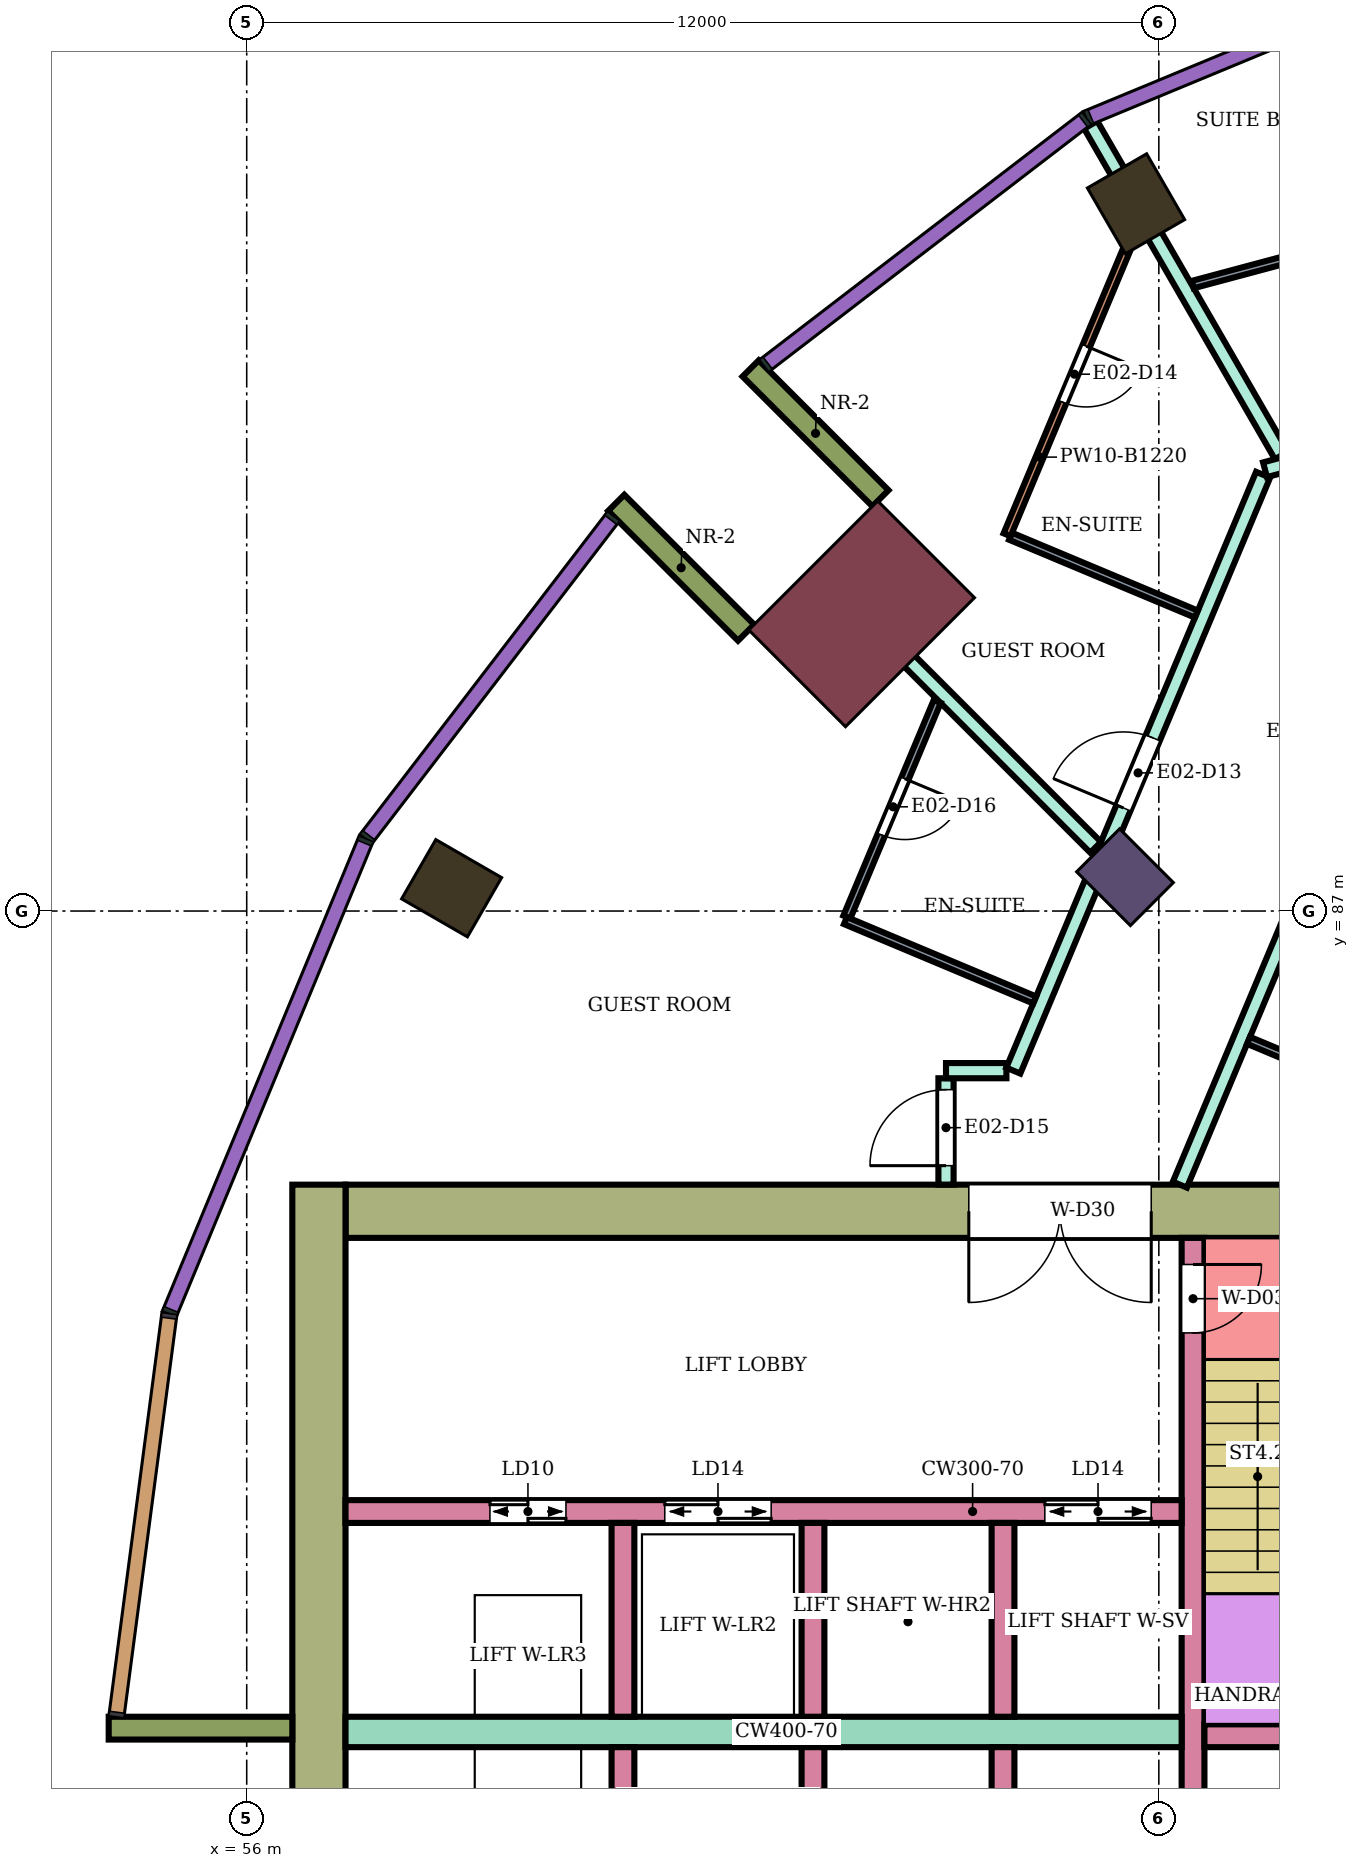
"""IFC4 building model, lengths in metres.
Left out: names, types, materials, properties, quantities, classifications, styles, units other than length and angle.
Written with IfcOpenShell. Run it as: python <this file> out.ifc"""

import sys

from ifc_helpers import new_model, si_unit, direction, frame, frame_2d, origin, origin_2d, place, context, subcontext, project, spatial, rectangle, extrude, element, fill, save


model = new_model("IFC4")
c1 = context("Model", 3, precision=1e-05, world=origin(), true_north=direction((0.0, 1.0)))
c2 = subcontext(c1, "Body", "Model", "MODEL_VIEW")
j1 = project(units=[si_unit("LENGTHUNIT", "METRE"), si_unit("PLANEANGLEUNIT", "RADIAN")], contexts=[c1])
p1 = place(None, origin())
s1 = spatial("IfcSite", under=j1, at=p1, CompositionType="ELEMENT")
p2 = place(p1, origin())
s2 = spatial("IfcBuilding", under=s1, at=p2, CompositionType="ELEMENT")
p3 = place(p2, frame((0.0, 0.0, 130.2)))
s3 = spatial("IfcBuildingStorey", under=s2, at=p3, CompositionType="ELEMENT", Elevation=130.2)
for number, where, z_axis, x_axis in (
    (1, (67.7, 96.304, 0.0), (0.0, 0.0, 1.0), (-0.5, 0.866, 0.0)),
    (2, (58.696, 87.3, 0.0), (0.0, 0.0, 1.0), (-0.866, 0.5, 0.0)),
):
    element("IfcColumn", number, at=place(p3, frame(where, z_axis=z_axis, x_axis=x_axis)), inside=s3, PredefinedType="COLUMN", context=c2, shape_type="SweptSolid", body=[
        extrude(rectangle(XDim=1.0, YDim=0.9, at=origin_2d()), origin(), (0.0, 0.0, 1.0), 3.9),
    ])
p4 = place(p3, frame((67.555, 87.445, 0.0), z_axis=(0.0, 0.0, 1.0), x_axis=(-0.707106781187, 0.707106781187, 0.0)))
e3 = element("IfcColumn", 3, at=p4, inside=s3, PredefinedType="COLUMN", context=c2, shape_type="SweptSolid", body=[
    extrude(rectangle(XDim=1.0, YDim=0.8, at=origin_2d()), origin(), (0.0, 0.0, 1.0), 3.9),
])
p5 = place(p3, frame((64.09, 90.91, 0.0), z_axis=(0.0, 0.0, 1.0), x_axis=(-0.707106781187, 0.707106781187, 0.0)))
e4 = element("IfcColumn", 4, at=p5, inside=s3, PredefinedType="COLUMN", context=c2, shape_type="SweptSolid", body=[
    extrude(rectangle(XDim=1.8, YDim=2.4, at=origin_2d()), origin(), (0.0, 0.0, 1.0), 3.9),
])
p6 = place(p3, frame((72.1, 83.05, 0.0), z_axis=(0.0, 0.0, 1.0), x_axis=(-1.0, 0.0, 0.0)))
e5 = element("IfcWall", 5, at=p6, inside=s3, PredefinedType="SHEAR", context=c2, shape_type="SweptSolid", body=[
    extrude(rectangle(XDim=14.8, YDim=0.7, at=frame_2d((7.4, 0.0))), origin(), (0.0, 0.0, 1.0), 3.58),
])
p7 = place(p6, frame((4.2, 0.0, 0.0)))
e6 = element("IfcOpeningElement", 6, at=p7, cuts=e5, PredefinedType="OPENING", context=c2, shape_type="SweptSolid", body=[
    extrude(rectangle(XDim=2.4, YDim=2.4, at=frame_2d((1.2, 1.2))), frame((0.0, 0.36, 0.0), z_axis=(0.0, -1.0, 0.0), x_axis=(1.0, 0.0, 0.0)), (0.0, 0.0, 1.0), 0.72),
])
p8 = place(p3, frame((56.95, 83.4, 0.0), z_axis=(0.0, 0.0, 1.0), x_axis=(0.0, -1.0, 0.0)))
e7 = element("IfcWall", 7, at=p8, inside=s3, PredefinedType="SHEAR", context=c2, shape_type="SweptSolid", body=[
    extrude(rectangle(XDim=16.8, YDim=0.7, at=frame_2d((8.4, 0.0))), origin(), (0.0, 0.0, 1.0), 3.58),
])
p9 = place(p3, frame((68.45, 82.7, 0.0), z_axis=(0.0, 0.0, 1.0), x_axis=(0.0, -1.0, 0.0)))
e8 = element("IfcWall", 8, at=p9, inside=s3, PredefinedType="SHEAR", context=c2, shape_type="SweptSolid", body=[
    extrude(rectangle(XDim=7.7, YDim=0.3, at=frame_2d((3.85, 0.0))), origin(), (0.0, 0.0, 1.0), 3.58),
])
p10 = place(p9, frame((0.35, 0.0, 0.0)))
e9 = element("IfcOpeningElement", 9, at=p10, cuts=e8, PredefinedType="OPENING", context=c2, shape_type="SweptSolid", body=[
    extrude(rectangle(XDim=0.9, YDim=2.1, at=frame_2d((0.45, 1.05))), frame((0.0, 0.16, 0.0), z_axis=(0.0, -1.0, 0.0), x_axis=(1.0, 0.0, 0.0)), (0.0, 0.0, 1.0), 0.32),
])
p11 = place(p3, frame((71.65, 76.15, 0.0), z_axis=(0.0, 0.0, 1.0), x_axis=(-1.0, 0.0, 0.0)))
e10 = element("IfcWall", 10, at=p11, inside=s3, PredefinedType="SHEAR", context=c2, shape_type="SweptSolid", body=[
    extrude(rectangle(XDim=3.05, YDim=0.3, at=frame_2d((1.525, 0.0))), origin(), (0.0, 0.0, 1.0), 3.58),
])
p12 = place(p3, frame((68.3, 76.2, 0.0), z_axis=(0.0, 0.0, 1.0), x_axis=(-1.0, 0.0, 0.0)))
e11 = element("IfcWall", 11, at=p12, inside=s3, PredefinedType="SHEAR", context=c2, shape_type="SweptSolid", body=[
    extrude(rectangle(XDim=11.0, YDim=0.4, at=frame_2d((5.5, 0.0))), origin(), (0.0, 0.0, 1.0), 3.58),
])
p13 = place(p3, frame((68.3, 79.1, 0.0), z_axis=(0.0, 0.0, 1.0), x_axis=(-1.0, 0.0, 0.0)))
e12 = element("IfcWall", 12, at=p13, inside=s3, PredefinedType="SHEAR", context=c2, shape_type="SweptSolid", body=[
    extrude(rectangle(XDim=11.0, YDim=0.3, at=frame_2d((5.5, 0.0))), origin(), (0.0, 0.0, 1.0), 3.58),
])
p14 = place(p13, frame((0.4, 0.0, 0.0)))
e13 = element("IfcOpeningElement", 13, at=p14, cuts=e12, PredefinedType="OPENING", context=c2, shape_type="SweptSolid", body=[
    extrude(rectangle(XDim=1.4, YDim=2.1, at=frame_2d((0.7, 1.05))), frame((0.0, 0.16, 0.0), z_axis=(0.0, -1.0, 0.0), x_axis=(1.0, 0.0, 0.0)), (0.0, 0.0, 1.0), 0.32),
])
p15 = place(p13, frame((5.4, 0.0, 0.0)))
e14 = element("IfcOpeningElement", 14, at=p15, cuts=e12, PredefinedType="OPENING", context=c2, shape_type="SweptSolid", body=[
    extrude(rectangle(XDim=1.4, YDim=2.1, at=frame_2d((0.7, 1.05))), frame((0.0, 0.16, 0.0), z_axis=(0.0, -1.0, 0.0), x_axis=(1.0, 0.0, 0.0)), (0.0, 0.0, 1.0), 0.32),
])
p16 = place(p13, frame((8.1, 0.0, 0.0)))
e15 = element("IfcOpeningElement", 15, at=p16, cuts=e12, PredefinedType="OPENING", context=c2, shape_type="SweptSolid", body=[
    extrude(rectangle(XDim=1.0, YDim=2.1, at=frame_2d((0.5, 1.05))), frame((0.0, 0.16, 0.0), z_axis=(0.0, -1.0, 0.0), x_axis=(1.0, 0.0, 0.0)), (0.0, 0.0, 1.0), 0.32),
])
for number, where, z_axis, x_axis in (
    (16, (65.95, 76.0, 0.0), (0.0, 0.0, 1.0), (0.0, -1.0, 0.0)),
    (17, (63.45, 76.0, 0.0), (0.0, 0.0, 1.0), (0.0, -1.0, 0.0)),
    (18, (60.95, 76.0, 0.0), (0.0, 0.0, 1.0), (0.0, -1.0, 0.0)),
    (19, (65.95, 78.95, 0.0), (0.0, 0.0, 1.0), (0.0, -1.0, 0.0)),
    (20, (63.45, 78.95, 0.0), (0.0, 0.0, 1.0), (0.0, -1.0, 0.0)),
    (21, (60.95, 78.95, 0.0), (0.0, 0.0, 1.0), (0.0, -1.0, 0.0)),
):
    element("IfcWall", number, at=place(p3, frame(where, z_axis=z_axis, x_axis=x_axis)), inside=s3, PredefinedType="SHEAR", context=c2, shape_type="SweptSolid", body=[
        extrude(rectangle(XDim=2.55, YDim=0.3, at=frame_2d((1.275, 0.0))), origin(), (0.0, 0.0, 1.0), 3.58),
    ])
for number, where, z_axis, x_axis in (
    (22, (64.338, 92.43, 0.0), (0.0, 0.0, 1.0), (-0.707, 0.707, 0.0)),
    (23, (62.57, 90.662, 0.0), (0.0, 0.0, 1.0), (-0.707, 0.707, 0.0)),
    (24, (56.6, 76.25, 0.0), (0.0, 0.0, 1.0), (-1.0, 0.0, 0.0)),
):
    element("IfcWall", number, at=place(p3, frame(where, z_axis=z_axis, x_axis=x_axis)), inside=s3, PredefinedType="NOTDEFINED", context=c2, shape_type="SweptSolid", body=[
        extrude(rectangle(XDim=2.416, YDim=0.3, at=frame_2d((1.208, 0.0))), origin(), (0.0, 0.0, 1.0), 3.9),
    ])
p17 = place(p3, frame((63.6, 91.409, 0.0), z_axis=(0.0, 0.0, 1.0), x_axis=(0.706937509868, -0.707276011993, 0.0)))
e25 = element("IfcWall", 25, at=p17, inside=s3, PredefinedType="PARTITIONING", context=c2, shape_type="SweptSolid", body=[
    extrude(rectangle(XDim=5.049, YDim=0.2, at=frame_2d((2.524, 0.0))), origin(), (0.0, 0.0, 1.0), 3.45),
])
p18 = place(p3, frame((65.2, 83.401, 0.0), z_axis=(0.0, 0.0, 1.0), x_axis=(0.0, 1.0, 0.0)))
e26 = element("IfcWall", 26, at=p18, inside=s3, PredefinedType="PARTITIONING", context=c2, shape_type="SweptSolid", body=[
    extrude(rectangle(XDim=1.399, YDim=0.2, at=frame_2d((0.7, 0.0))), origin(), (0.0, 0.0, 1.0), 3.45),
])
p19 = place(p18, frame((0.249, 0.0, 0.0)))
e27 = element("IfcOpeningElement", 27, at=p19, cuts=e26, PredefinedType="OPENING", context=c2, shape_type="SweptSolid", body=[
    extrude(rectangle(XDim=1.0, YDim=2.1, at=frame_2d((0.5, 1.05))), frame((0.0, 0.11, 0.0), z_axis=(0.0, -1.0, 0.0), x_axis=(1.0, 0.0, 0.0)), (0.0, 0.0, 1.0), 0.22),
])
p20 = place(p3, frame((65.2, 84.9, 0.0), z_axis=(0.0, 0.0, 1.0), x_axis=(1.0, 0.0, 0.0)))
e28 = element("IfcWall", 28, at=p20, inside=s3, PredefinedType="PARTITIONING", context=c2, shape_type="SweptSolid", body=[
    extrude(rectangle(XDim=0.795, YDim=0.2, at=frame_2d((0.397, 0.0))), origin(), (0.0, 0.0, 1.0), 3.45),
])
p21 = place(p3, frame((66.085, 84.9, 0.0), z_axis=(0.0, 0.0, 1.0), x_axis=(0.386617151403, 0.922240303956, 0.0)))
e29 = element("IfcWall", 29, at=p21, inside=s3, PredefinedType="PARTITIONING", context=c2, shape_type="SweptSolid", body=[
    extrude(rectangle(XDim=8.5, YDim=0.2, at=frame_2d((4.25, 0.0))), origin(), (0.0, 0.0, 1.0), 3.45),
])
p22 = place(p21, frame((3.748, 0.0, 0.0)))
e30 = element("IfcOpeningElement", 30, at=p22, cuts=e29, PredefinedType="OPENING", context=c2, shape_type="SweptSolid", body=[
    extrude(rectangle(XDim=1.0, YDim=2.1, at=frame_2d((0.5, 1.05))), frame((0.0, 0.11, 0.0), z_axis=(0.0, -1.0, 0.0), x_axis=(1.0, 0.0, 0.0)), (0.0, 0.0, 1.0), 0.22),
])
p23 = place(p3, frame((67.104, 97.343, 0.0), z_axis=(0.0, 0.0, 1.0), x_axis=(0.499893606134, -0.866086821598, 0.0)))
e31 = element("IfcWall", 31, at=p23, inside=s3, PredefinedType="PARTITIONING", context=c2, shape_type="SweptSolid", body=[
    extrude(rectangle(XDim=5.021, YDim=0.2, at=frame_2d((2.511, 0.0))), origin(), (0.0, 0.0, 1.0), 3.45),
])
p24 = place(p3, frame((68.277, 83.4, 0.0), z_axis=(0.0, 0.0, 1.0), x_axis=(0.386454861164, 0.922308321703, 0.0)))
e32 = element("IfcWall", 32, at=p24, inside=s3, PredefinedType="PARTITIONING", context=c2, shape_type="SweptSolid", body=[
    extrude(rectangle(XDim=7.762, YDim=0.2, at=frame_2d((3.881, 0.0))), origin(), (0.0, 0.0, 1.0), 3.45),
])
p25 = place(p24, frame((5.351, 0.0, 0.0)))
e33 = element("IfcOpeningElement", 33, at=p25, cuts=e32, PredefinedType="OPENING", context=c2, shape_type="SweptSolid", body=[
    extrude(rectangle(XDim=1.0, YDim=2.1, at=frame_2d((0.5, 1.05))), frame((0.0, 0.11, 0.0), z_axis=(0.0, -1.0, 0.0), x_axis=(1.0, 0.0, 0.0)), (0.0, 0.0, 1.0), 0.22),
])
p26 = place(p3, frame((69.397, 92.805, 0.0), z_axis=(0.0, 0.0, 1.0), x_axis=(0.965971666602, 0.258647906087, 0.0)))
e34 = element("IfcWall", 34, at=p26, inside=s3, PredefinedType="PARTITIONING", context=c2, shape_type="SweptSolid", body=[
    extrude(rectangle(XDim=10.887, YDim=0.2, at=frame_2d((5.443, 0.0))), origin(), (0.0, 0.0, 1.0), 3.45),
])
p27 = place(p26, frame((6.163, 0.0, 0.0)))
e35 = element("IfcOpeningElement", 35, at=p27, cuts=e34, PredefinedType="OPENING", context=c2, shape_type="SweptSolid", body=[
    extrude(rectangle(XDim=1.0, YDim=2.1, at=frame_2d((0.5, 1.05))), frame((0.0, 0.11, 0.0), z_axis=(0.0, -1.0, 0.0), x_axis=(1.0, 0.0, 0.0)), (0.0, 0.0, 1.0), 0.22),
])
p28 = place(p26, frame((2.461, 0.0, 0.0)))
e36 = element("IfcOpeningElement", 36, at=p28, cuts=e34, PredefinedType="OPENING", context=c2, shape_type="SweptSolid", body=[
    extrude(rectangle(XDim=1.0, YDim=2.1, at=frame_2d((0.5, 1.05))), frame((0.0, 0.11, 0.0), z_axis=(0.0, -1.0, 0.0), x_axis=(1.0, 0.0, 0.0)), (0.0, 0.0, 1.0), 0.22),
])
p29 = place(p3, frame((63.896, 86.92, 0.0), z_axis=(0.0, 0.0, 1.0), x_axis=(0.386637413037, 0.922231809709, 0.0)))
e37 = element("IfcWall", 37, at=p29, inside=s3, PredefinedType="PARTITIONING", context=c2, shape_type="SweptSolid", body=[
    extrude(rectangle(XDim=3.076, YDim=0.1, at=frame_2d((1.538, 0.0))), origin(), (0.0, 0.0, 1.0), 3.45),
])
p30 = place(p29, frame((1.173, 0.0, 0.0)))
e38 = element("IfcOpeningElement", 38, at=p30, cuts=e37, PredefinedType="OPENING", context=c2, shape_type="SweptSolid", body=[
    extrude(rectangle(XDim=0.8, YDim=2.1, at=frame_2d((0.4, 1.05))), frame((0.0, 0.06, 0.0), z_axis=(0.0, -1.0, 0.0), x_axis=(1.0, 0.0, 0.0)), (0.0, 0.0, 1.0), 0.12),
])
p31 = place(p3, frame((63.877, 86.874, 0.0), z_axis=(0.0, 0.0, 1.0), x_axis=(0.92214860299, -0.386835823062, 0.0)))
e39 = element("IfcWall", 39, at=p31, inside=s3, PredefinedType="PARTITIONING", context=c2, shape_type="SweptSolid", body=[
    extrude(rectangle(XDim=2.7, YDim=0.1, at=frame_2d((1.35, 0.0))), origin(), (0.0, 0.0, 1.0), 3.45),
])
p32 = place(p3, frame((66.049, 91.931, 0.0), z_axis=(0.0, 0.0, 1.0), x_axis=(0.922344808264, -0.38636777126, 0.0)))
e40 = element("IfcWall", 40, at=p32, inside=s3, PredefinedType="PARTITIONING", context=c2, shape_type="SweptSolid", body=[
    extrude(rectangle(XDim=2.65, YDim=0.1, at=frame_2d((1.325, 0.0))), origin(), (0.0, 0.0, 1.0), 3.45),
])
p33 = place(p3, frame((66.004, 91.95, 0.0), z_axis=(0.0, 0.0, 1.0), x_axis=(0.386601257709, 0.922246966673, 0.0)))
e41 = element("IfcWall", 41, at=p33, inside=s3, PredefinedType="PARTITIONING", context=c2, shape_type="SweptSolid", body=[
    extrude(rectangle(XDim=4.433, YDim=0.1, at=frame_2d((2.216, 0.0))), origin(), (0.0, 0.0, 1.0), 2.68),
])
p34 = place(p33, frame((1.891, 0.0, 0.0)))
e42 = element("IfcOpeningElement", 42, at=p34, cuts=e41, PredefinedType="OPENING", context=c2, shape_type="SweptSolid", body=[
    extrude(rectangle(XDim=0.8, YDim=2.1, at=frame_2d((0.4, 1.05))), frame((0.0, 0.06, 0.0), z_axis=(0.0, -1.0, 0.0), x_axis=(1.0, 0.0, 0.0)), (0.0, 0.0, 1.0), 0.12),
])
p35 = place(p3, frame((68.447, 95.242, 0.0), z_axis=(0.0, 0.0, 1.0), x_axis=(0.965958178477, 0.258698274894, 0.0)))
e43 = element("IfcWall", 43, at=p35, inside=s3, PredefinedType="PARTITIONING", context=c2, shape_type="SweptSolid", body=[
    extrude(rectangle(XDim=5.81, YDim=0.1, at=frame_2d((2.905, 0.0))), origin(), (0.0, 0.0, 1.0), 3.45),
])
p36 = place(p35, frame((1.46, 0.0, 0.0)))
e44 = element("IfcOpeningElement", 44, at=p36, cuts=e43, PredefinedType="OPENING", context=c2, shape_type="SweptSolid", body=[
    extrude(rectangle(XDim=0.9, YDim=2.1, at=frame_2d((0.45, 1.05))), frame((0.0, 0.06, 0.0), z_axis=(0.0, -1.0, 0.0), x_axis=(1.0, 0.0, 0.0)), (0.0, 0.0, 1.0), 0.12),
])
p37 = place(p3, frame((69.181, 85.298, 0.0), z_axis=(0.0, 0.0, 1.0), x_axis=(0.922377635784, -0.38628939541, 0.0)))
e45 = element("IfcWall", 45, at=p37, inside=s3, PredefinedType="PARTITIONING", context=c2, shape_type="SweptSolid", body=[
    extrude(rectangle(XDim=2.65, YDim=0.1, at=frame_2d((1.325, 0.0))), origin(), (0.0, 0.0, 1.0), 3.45),
])
p38 = place(p37, frame((0.9, 0.0, 0.0)))
e46 = element("IfcOpeningElement", 46, at=p38, cuts=e45, PredefinedType="OPENING", context=c2, shape_type="SweptSolid", body=[
    extrude(rectangle(XDim=0.8, YDim=2.1, at=frame_2d((0.4, 1.05))), frame((0.0, 0.06, 0.0), z_axis=(0.0, -1.0, 0.0), x_axis=(1.0, 0.0, 0.0)), (0.0, 0.0, 1.0), 0.12),
])
p39 = place(p22, origin())
e47 = element("IfcDoor", 47, at=p39, inside=s3, OperationType="SINGLE_SWING_LEFT", PredefinedType="DOOR", context=c2, shape_type="SweptSolid", body=[
    extrude(rectangle(XDim=1.0, YDim=2.1, at=frame_2d((0.5, 1.05))), frame((0.0, 0.025, 0.0), z_axis=(0.0, -1.0, 0.0), x_axis=(1.0, 0.0, 0.0)), (0.0, 0.0, 1.0), 0.05),
])
fill(e30, e47)
p40 = place(p34, frame((0.8, 0.0, 0.0), z_axis=(0.0, 0.0, 1.0), x_axis=(-1.0, 0.0, 0.0)))
e48 = element("IfcDoor", 48, at=p40, inside=s3, OperationType="SINGLE_SWING_LEFT", PredefinedType="DOOR", context=c2, shape_type="SweptSolid", body=[
    extrude(rectangle(XDim=0.8, YDim=2.1, at=frame_2d((0.4, 1.05))), frame((0.0, 0.025, 0.0), z_axis=(0.0, -1.0, 0.0), x_axis=(1.0, 0.0, 0.0)), (0.0, 0.0, 1.0), 0.05),
])
fill(e42, e48)
p41 = place(p19, origin())
e49 = element("IfcDoor", 49, at=p41, inside=s3, OperationType="SINGLE_SWING_LEFT", PredefinedType="DOOR", context=c2, shape_type="SweptSolid", body=[
    extrude(rectangle(XDim=1.0, YDim=2.1, at=frame_2d((0.5, 1.05))), frame((0.0, 0.025, 0.0), z_axis=(0.0, -1.0, 0.0), x_axis=(1.0, 0.0, 0.0)), (0.0, 0.0, 1.0), 0.05),
])
fill(e27, e49)
p42 = place(p30, frame((0.8, 0.0, 0.0), z_axis=(0.0, 0.0, 1.0), x_axis=(-1.0, 0.0, 0.0)))
e50 = element("IfcDoor", 50, at=p42, inside=s3, OperationType="SINGLE_SWING_LEFT", PredefinedType="DOOR", context=c2, shape_type="SweptSolid", body=[
    extrude(rectangle(XDim=0.8, YDim=2.1, at=frame_2d((0.4, 1.05))), frame((0.0, 0.025, 0.0), z_axis=(0.0, -1.0, 0.0), x_axis=(1.0, 0.0, 0.0)), (0.0, 0.0, 1.0), 0.05),
])
fill(e38, e50)
p43 = place(p10, origin())
e51 = element("IfcDoor", 51, at=p43, inside=s3, OperationType="SINGLE_SWING_LEFT", PredefinedType="DOOR", context=c2, shape_type="SweptSolid", body=[
    extrude(rectangle(XDim=0.9, YDim=2.1, at=frame_2d((0.45, 1.05))), frame((0.0, 0.025, 0.0), z_axis=(0.0, -1.0, 0.0), x_axis=(1.0, 0.0, 0.0)), (0.0, 0.0, 1.0), 0.05),
])
fill(e9, e51)
p44 = place(p14, origin())
e52 = element("IfcDoor", 52, at=p44, inside=s3, OperationType="DOUBLE_DOOR_SLIDING", PredefinedType="DOOR", context=c2, shape_type="SweptSolid", body=[
    extrude(rectangle(XDim=1.4, YDim=2.1, at=frame_2d((0.7, 1.05))), frame((0.0, 0.025, 0.0), z_axis=(0.0, -1.0, 0.0), x_axis=(1.0, 0.0, 0.0)), (0.0, 0.0, 1.0), 0.05),
])
fill(e13, e52)
p45 = place(p15, origin())
e53 = element("IfcDoor", 53, at=p45, inside=s3, OperationType="DOUBLE_DOOR_SLIDING", PredefinedType="DOOR", context=c2, shape_type="SweptSolid", body=[
    extrude(rectangle(XDim=1.4, YDim=2.1, at=frame_2d((0.7, 1.05))), frame((0.0, 0.025, 0.0), z_axis=(0.0, -1.0, 0.0), x_axis=(1.0, 0.0, 0.0)), (0.0, 0.0, 1.0), 0.05),
])
fill(e14, e53)
p46 = place(p16, origin())
e54 = element("IfcDoor", 54, at=p46, inside=s3, OperationType="DOUBLE_DOOR_SLIDING", PredefinedType="DOOR", context=c2, shape_type="SweptSolid", body=[
    extrude(rectangle(XDim=1.0, YDim=2.1, at=frame_2d((0.5, 1.05))), frame((0.0, 0.025, 0.0), z_axis=(0.0, -1.0, 0.0), x_axis=(1.0, 0.0, 0.0)), (0.0, 0.0, 1.0), 0.05),
])
fill(e15, e54)
p47 = place(p7, origin())
e55 = element("IfcDoor", 55, at=p47, inside=s3, OperationType="DOUBLE_DOOR_SINGLE_SWING", PredefinedType="DOOR", context=c2, shape_type="SweptSolid", body=[
    extrude(rectangle(XDim=2.4, YDim=2.4, at=frame_2d((1.2, 1.2))), frame((0.0, 0.025, 0.0), z_axis=(0.0, -1.0, 0.0), x_axis=(1.0, 0.0, 0.0)), (0.0, 0.0, 1.0), 0.05),
])
fill(e6, e55)
save(model, sys.argv[1])
